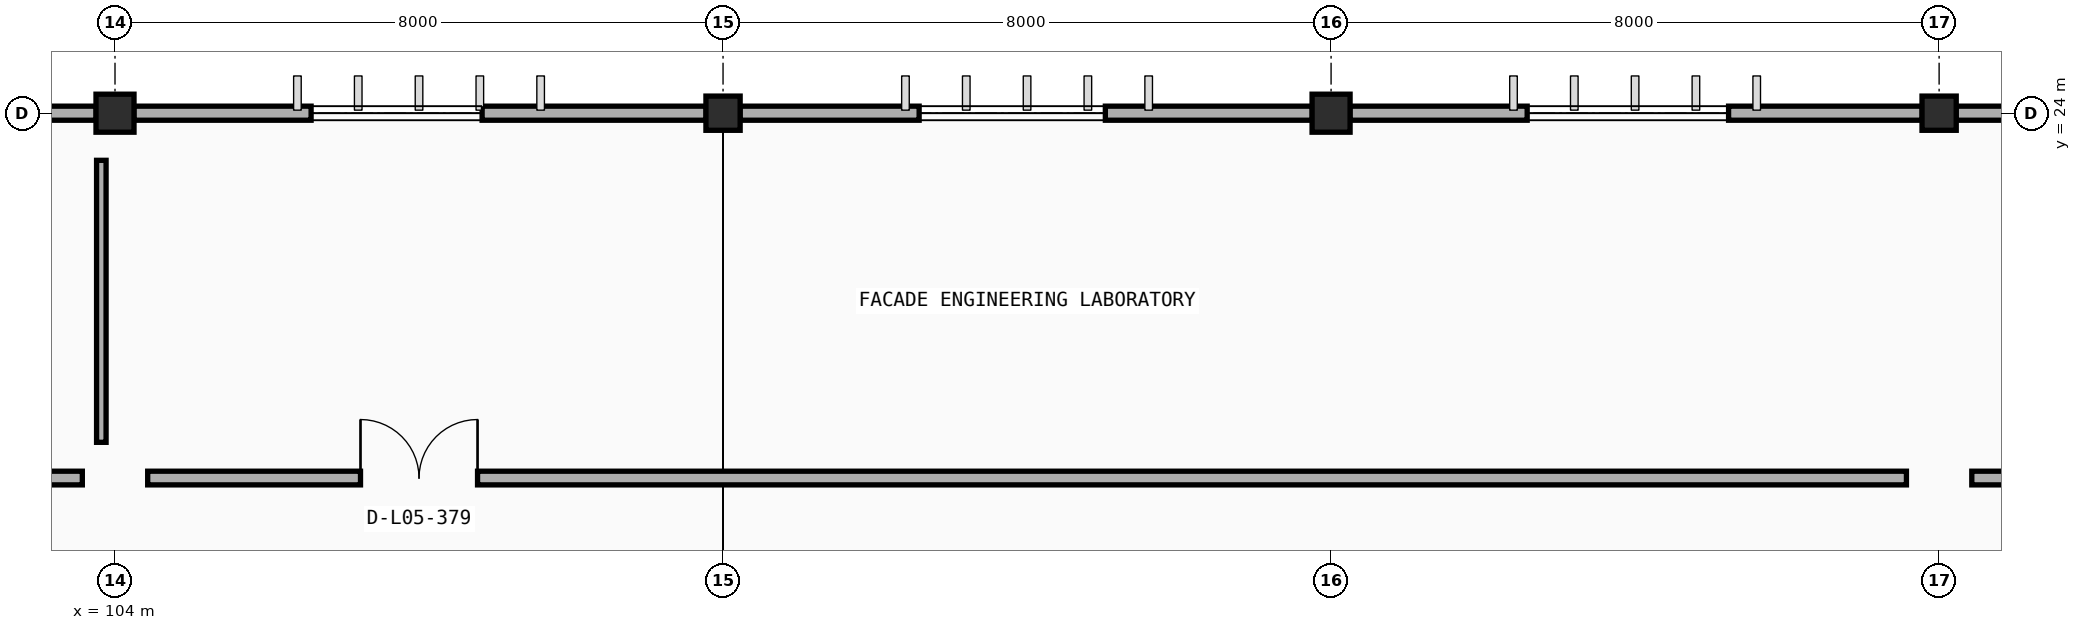
"""IFC4 building model, lengths in metres.
Left out: names, types, materials, properties, quantities, classifications, styles, units other than length and angle.
Written with IfcOpenShell. Run it as: python <this file> out.ifc"""

import sys

from ifc_helpers import new_model, si_unit, direction, frame, frame_2d, origin, origin_2d, place, context, subcontext, project, spatial, rectangle, extrude, element, fill, save


model = new_model("IFC4")
c1 = context("Model", 3, precision=1e-05, world=origin(), true_north=direction((0.0, 1.0)))
c2 = subcontext(c1, "Body", "Model", "MODEL_VIEW")
j1 = project(units=[si_unit("LENGTHUNIT", "METRE"), si_unit("PLANEANGLEUNIT", "RADIAN")], contexts=[c1])
p1 = place(None, origin())
s1 = spatial("IfcSite", under=j1, at=p1, CompositionType="ELEMENT")
p2 = place(p1, origin())
s2 = spatial("IfcBuilding", under=s1, at=p2, CompositionType="ELEMENT")
p3 = place(p2, frame((0.0, 0.0, 18.0)))
s3 = spatial("IfcBuildingStorey", under=s2, at=p3, CompositionType="ELEMENT", Elevation=18.0)
p4 = place(p3, frame((104.0, 24.0, 0.0), z_axis=(0.0, 0.0, 1.0), x_axis=(1.0, 0.0, 0.0)))
e1 = element("IfcColumn", 1, at=p4, inside=s3, PredefinedType="COLUMN", context=c2, shape_type="SweptSolid", body=[
    extrude(rectangle(XDim=0.5, YDim=0.5, at=origin_2d()), origin(), (0.0, 0.0, 1.0), 4.2),
])
p5 = place(p3, frame((112.0, 24.0, 0.0), z_axis=(0.0, 0.0, 1.0), x_axis=(1.0, 0.0, 0.0)))
e2 = element("IfcColumn", 2, at=p5, inside=s3, PredefinedType="COLUMN", context=c2, shape_type="SweptSolid", body=[
    extrude(rectangle(XDim=0.45, YDim=0.45, at=origin_2d()), origin(), (0.0, 0.0, 1.0), 4.2),
])
p6 = place(p3, frame((120.0, 24.0, 0.0), z_axis=(0.0, 0.0, 1.0), x_axis=(1.0, 0.0, 0.0)))
e3 = element("IfcColumn", 3, at=p6, inside=s3, PredefinedType="COLUMN", context=c2, shape_type="SweptSolid", body=[
    extrude(rectangle(XDim=0.5, YDim=0.5, at=origin_2d()), origin(), (0.0, 0.0, 1.0), 4.2),
])
p7 = place(p3, frame((128.0, 24.0, 0.0), z_axis=(0.0, 0.0, 1.0), x_axis=(1.0, 0.0, 0.0)))
e4 = element("IfcColumn", 4, at=p7, inside=s3, PredefinedType="COLUMN", context=c2, shape_type="SweptSolid", body=[
    extrude(rectangle(XDim=0.45, YDim=0.45, at=origin_2d()), origin(), (0.0, 0.0, 1.0), 4.2),
])
p8 = place(p3, frame((96.222, 24.0, 0.0), z_axis=(0.0, 0.0, 1.0), x_axis=(1.0, 0.0, 0.0)))
e5 = element("IfcWall", 5, at=p8, inside=s3, PredefinedType="STANDARD", context=c2, shape_type="SweptSolid", body=[
    extrude(rectangle(XDim=7.531, YDim=0.185, at=frame_2d((3.766, 0.0))), origin(), (0.0, 0.0, 1.0), 3.335),
])
p9 = place(p8, frame((2.358, 0.0, 0.9)))
e6 = element("IfcOpeningElement", 6, at=p9, cuts=e5, PredefinedType="OPENING", context=c2, shape_type="SweptSolid", body=[
    extrude(rectangle(XDim=2.05, YDim=1.4, at=frame_2d((1.025, 0.7))), frame((0.0, 0.103, 0.0), z_axis=(0.0, -1.0, 0.0), x_axis=(1.0, 0.0, 0.0)), (0.0, 0.0, 1.0), 0.205),
])
p10 = place(p3, frame((104.247, 24.0, 0.0), z_axis=(0.0, 0.0, 1.0), x_axis=(1.0, 0.0, 0.0)))
e7 = element("IfcWall", 7, at=p10, inside=s3, PredefinedType="STANDARD", context=c2, shape_type="SweptSolid", body=[
    extrude(rectangle(XDim=7.531, YDim=0.185, at=frame_2d((3.766, 0.0))), origin(), (0.0, 0.0, 1.0), 3.335),
])
p11 = place(p10, frame((2.333, 0.0, 0.9)))
e8 = element("IfcOpeningElement", 8, at=p11, cuts=e7, PredefinedType="OPENING", context=c2, shape_type="SweptSolid", body=[
    extrude(rectangle(XDim=2.25, YDim=1.4, at=frame_2d((1.125, 0.7))), frame((0.0, 0.103, 0.0), z_axis=(0.0, -1.0, 0.0), x_axis=(1.0, 0.0, 0.0)), (0.0, 0.0, 1.0), 0.205),
])
p12 = place(p3, frame((112.222, 24.0, 0.0), z_axis=(0.0, 0.0, 1.0), x_axis=(1.0, 0.0, 0.0)))
e9 = element("IfcWall", 9, at=p12, inside=s3, PredefinedType="STANDARD", context=c2, shape_type="SweptSolid", body=[
    extrude(rectangle(XDim=7.531, YDim=0.185, at=frame_2d((3.766, 0.0))), origin(), (0.0, 0.0, 1.0), 3.335),
])
p13 = place(p12, frame((2.358, 0.0, 0.9)))
e10 = element("IfcOpeningElement", 10, at=p13, cuts=e9, PredefinedType="OPENING", context=c2, shape_type="SweptSolid", body=[
    extrude(rectangle(XDim=2.45, YDim=1.4, at=frame_2d((1.225, 0.7))), frame((0.0, 0.103, 0.0), z_axis=(0.0, -1.0, 0.0), x_axis=(1.0, 0.0, 0.0)), (0.0, 0.0, 1.0), 0.205),
])
p14 = place(p3, frame((120.247, 24.0, 0.0), z_axis=(0.0, 0.0, 1.0), x_axis=(1.0, 0.0, 0.0)))
e11 = element("IfcWall", 11, at=p14, inside=s3, PredefinedType="STANDARD", context=c2, shape_type="SweptSolid", body=[
    extrude(rectangle(XDim=7.531, YDim=0.185, at=frame_2d((3.766, 0.0))), origin(), (0.0, 0.0, 1.0), 3.335),
])
p15 = place(p14, frame((2.333, 0.0, 0.9)))
e12 = element("IfcOpeningElement", 12, at=p15, cuts=e11, PredefinedType="OPENING", context=c2, shape_type="SweptSolid", body=[
    extrude(rectangle(XDim=2.65, YDim=1.4, at=frame_2d((1.325, 0.7))), frame((0.0, 0.103, 0.0), z_axis=(0.0, -1.0, 0.0), x_axis=(1.0, 0.0, 0.0)), (0.0, 0.0, 1.0), 0.205),
])
p16 = place(p3, frame((128.222, 24.0, 0.0), z_axis=(0.0, 0.0, 1.0), x_axis=(1.0, 0.0, 0.0)))
e13 = element("IfcWall", 13, at=p16, inside=s3, PredefinedType="STANDARD", context=c2, shape_type="SweptSolid", body=[
    extrude(rectangle(XDim=7.531, YDim=0.185, at=frame_2d((3.766, 0.0))), origin(), (0.0, 0.0, 1.0), 3.335),
])
p17 = place(p16, frame((2.358, 0.0, 0.9)))
e14 = element("IfcOpeningElement", 14, at=p17, cuts=e13, PredefinedType="OPENING", context=c2, shape_type="SweptSolid", body=[
    extrude(rectangle(XDim=2.05, YDim=1.4, at=frame_2d((1.025, 0.7))), frame((0.0, 0.103, 0.0), z_axis=(0.0, -1.0, 0.0), x_axis=(1.0, 0.0, 0.0)), (0.0, 0.0, 1.0), 0.205),
])
p18 = place(p3, frame((80.43, 19.2, 0.0), z_axis=(0.0, 0.0, 1.0), x_axis=(1.0, 0.0, 0.0)))
e15 = element("IfcWall", 15, at=p18, inside=s3, PredefinedType="PARTITIONING", context=c2, shape_type="SweptSolid", body=[
    extrude(rectangle(XDim=23.14, YDim=0.18, at=frame_2d((11.57, 0.0))), origin(), (0.0, 0.0, 1.0), 3.3),
])
p19 = place(p18, frame((2.97, 0.0, 0.0)))
e16 = element("IfcOpeningElement", 16, at=p19, cuts=e15, PredefinedType="OPENING", context=c2, shape_type="SweptSolid", body=[
    extrude(rectangle(XDim=1.2, YDim=2.15, at=frame_2d((0.6, 1.075))), frame((0.0, 0.1, 0.0), z_axis=(0.0, -1.0, 0.0), x_axis=(1.0, 0.0, 0.0)), (0.0, 0.0, 1.0), 0.2),
])
p20 = place(p3, frame((103.82, 19.67, 0.0), z_axis=(0.0, 0.0, 1.0), x_axis=(0.0, 1.0, 0.0)))
e17 = element("IfcWall", 17, at=p20, inside=s3, PredefinedType="PARTITIONING", context=c2, shape_type="SweptSolid", body=[
    extrude(rectangle(XDim=3.71, YDim=0.125, at=frame_2d((1.855, 0.0))), origin(), (0.0, 0.0, 1.0), 3.3),
])
p21 = place(p3, frame((104.43, 19.2, 0.0), z_axis=(0.0, 0.0, 1.0), x_axis=(1.0, 0.0, 0.0)))
e18 = element("IfcWall", 18, at=p21, inside=s3, PredefinedType="PARTITIONING", context=c2, shape_type="SweptSolid", body=[
    extrude(rectangle(XDim=23.14, YDim=0.18, at=frame_2d((11.57, 0.0))), origin(), (0.0, 0.0, 1.0), 3.3),
])
p22 = place(p21, frame((2.8, 0.0, 0.0)))
e19 = element("IfcOpeningElement", 19, at=p22, cuts=e18, PredefinedType="OPENING", context=c2, shape_type="SweptSolid", body=[
    extrude(rectangle(XDim=1.54, YDim=2.2, at=frame_2d((0.77, 1.1))), frame((0.0, 0.1, 0.0), z_axis=(0.0, -1.0, 0.0), x_axis=(1.0, 0.0, 0.0)), (0.0, 0.0, 1.0), 0.2),
])
p23 = place(p3, frame((128.43, 19.2, 0.0), z_axis=(0.0, 0.0, 1.0), x_axis=(1.0, 0.0, 0.0)))
e20 = element("IfcWall", 20, at=p23, inside=s3, PredefinedType="PARTITIONING", context=c2, shape_type="SweptSolid", body=[
    extrude(rectangle(XDim=23.14, YDim=0.18, at=frame_2d((11.57, 0.0))), origin(), (0.0, 0.0, 1.0), 3.3),
])
p24 = place(p23, frame((2.895, 0.0, 0.0)))
e21 = element("IfcOpeningElement", 21, at=p24, cuts=e20, PredefinedType="OPENING", context=c2, shape_type="SweptSolid", body=[
    extrude(rectangle(XDim=1.35, YDim=2.2, at=frame_2d((0.675, 1.1))), frame((0.0, 0.1, 0.0), z_axis=(0.0, -1.0, 0.0), x_axis=(1.0, 0.0, 0.0)), (0.0, 0.0, 1.0), 0.2),
])
p25 = place(p11, origin())
e22 = element("IfcWindow", 22, at=p25, inside=s3, PartitioningType="DOUBLE_PANEL_VERTICAL", PredefinedType="WINDOW", context=c2, shape_type="SweptSolid", body=[
    extrude(rectangle(XDim=2.25, YDim=1.4, at=frame_2d((1.125, 0.7))), frame((0.0, 0.03, 0.0), z_axis=(0.0, -1.0, 0.0), x_axis=(1.0, 0.0, 0.0)), (0.0, 0.0, 1.0), 0.06),
])
fill(e8, e22)
p26 = place(p13, origin())
e23 = element("IfcWindow", 23, at=p26, inside=s3, PartitioningType="DOUBLE_PANEL_VERTICAL", PredefinedType="WINDOW", context=c2, shape_type="SweptSolid", body=[
    extrude(rectangle(XDim=2.45, YDim=1.4, at=frame_2d((1.225, 0.7))), frame((0.0, 0.03, 0.0), z_axis=(0.0, -1.0, 0.0), x_axis=(1.0, 0.0, 0.0)), (0.0, 0.0, 1.0), 0.06),
])
fill(e10, e23)
p27 = place(p15, origin())
e24 = element("IfcWindow", 24, at=p27, inside=s3, PartitioningType="DOUBLE_PANEL_VERTICAL", PredefinedType="WINDOW", context=c2, shape_type="SweptSolid", body=[
    extrude(rectangle(XDim=2.65, YDim=1.4, at=frame_2d((1.325, 0.7))), frame((0.0, 0.03, 0.0), z_axis=(0.0, -1.0, 0.0), x_axis=(1.0, 0.0, 0.0)), (0.0, 0.0, 1.0), 0.06),
])
fill(e12, e24)
p28 = place(p22, origin())
e25 = element("IfcDoor", 25, at=p28, inside=s3, OperationType="DOUBLE_DOOR_SINGLE_SWING", PredefinedType="DOOR", context=c2, shape_type="SweptSolid", body=[
    extrude(rectangle(XDim=1.54, YDim=2.2, at=frame_2d((0.77, 1.1))), frame((0.0, 0.025, 0.0), z_axis=(0.0, -1.0, 0.0), x_axis=(1.0, 0.0, 0.0)), (0.0, 0.0, 1.0), 0.05),
])
fill(e19, e25)
save(model, sys.argv[1])
